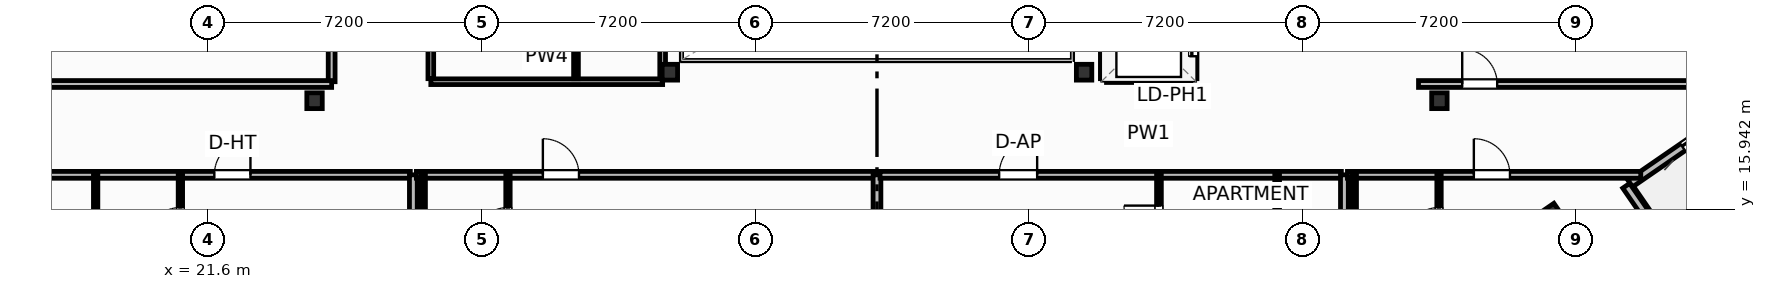
"""IFC4 building model, lengths in metres.
Left out: names, types, materials, properties, quantities, classifications, styles, units other than length and angle.
Written with IfcOpenShell. Run it as: python <this file> out.ifc"""

import sys

from ifc_helpers import new_model, si_unit, direction, frame, frame_2d, origin, origin_2d, place, context, subcontext, project, spatial, rectangle, i_section, extrude, element, fill, save


model = new_model("IFC4")
c1 = context("Model", 3, precision=1e-05, world=origin(), true_north=direction((0.0, 1.0)))
c2 = subcontext(c1, "Body", "Model", "MODEL_VIEW")
j1 = project(units=[si_unit("LENGTHUNIT", "METRE"), si_unit("PLANEANGLEUNIT", "RADIAN")], contexts=[c1])
p1 = place(None, origin())
s1 = spatial("IfcSite", under=j1, at=p1, CompositionType="ELEMENT")
p2 = place(p1, origin())
s2 = spatial("IfcBuilding", under=s1, at=p2, CompositionType="ELEMENT")
p3 = place(p2, frame((0.0, 0.0, 276.7)))
s3 = spatial("IfcBuildingStorey", under=s2, at=p3, CompositionType="ELEMENT", Elevation=276.7)
for number, where, z_axis, x_axis in (
    (1, (33.75, 19.55, 0.0), (0.0, 0.0, 1.0), (1.0, 0.0, 0.0)),
    (2, (44.65, 19.55, 0.0), (0.0, 0.0, 1.0), (1.0, 0.0, 0.0)),
    (3, (24.4, 18.8, 0.0), (0.0, 0.0, 1.0), (1.0, 0.0, 0.0)),
    (4, (54.0, 18.8, 0.0), (0.0, 0.0, 1.0), (1.0, 0.0, 0.0)),
):
    element("IfcColumn", number, at=place(p3, frame(where, z_axis=z_axis, x_axis=x_axis)), inside=s3, PredefinedType="COLUMN", context=c2, shape_type="SweptSolid", body=[
        extrude(i_section(OverallWidth=0.406, OverallDepth=0.416, WebThickness=0.03, FlangeThickness=0.048, FilletRadius=0.025, at=origin_2d()), origin(), (0.0, 0.0, 1.0), 3.7),
    ])
p4 = place(p3, frame((56.96, 15.823, 0.0), z_axis=(0.0, 0.0, 1.0), x_axis=(0.823532597628, 0.567268949127, 0.0)))
e5 = element("IfcColumn", 5, at=p4, inside=s3, PredefinedType="COLUMN", context=c2, shape_type="SweptSolid", body=[
    extrude(i_section(OverallWidth=0.401, OverallDepth=0.399, WebThickness=0.025, FlangeThickness=0.04, FilletRadius=0.022, at=origin_2d()), origin(), (0.0, 0.0, 1.0), 3.7),
])
p5 = place(p3, frame((63.605, 19.78, 0.0), z_axis=(0.0, 0.0, 1.0), x_axis=(-0.823541290762, -0.567256328665, 0.0)))
e6 = element("IfcWall", 6, at=p5, inside=s3, PredefinedType="SOLIDWALL", context=c2, shape_type="SweptSolid", body=[
    extrude(rectangle(XDim=5.567, YDim=0.22, at=frame_2d((2.784, 0.0))), origin(), (0.0, 0.0, 1.0), 2.73),
])
p6 = place(p5, frame((1.787, 0.0, 0.0)))
e7 = element("IfcOpeningElement", 7, at=p6, cuts=e6, PredefinedType="OPENING", context=c2, shape_type="SweptSolid", body=[
    extrude(rectangle(XDim=2.1, YDim=2.3, at=frame_2d((1.05, 1.15))), frame((0.0, 0.12, 0.0), z_axis=(0.0, -1.0, 0.0), x_axis=(1.0, 0.0, 0.0)), (0.0, 0.0, 1.0), 0.24),
])
p7 = place(p3, frame((60.036, 14.936, 0.0), z_axis=(0.0, 0.0, 1.0), x_axis=(-0.567273565974, 0.823529417415, 0.0)))
e8 = element("IfcWall", 8, at=p7, inside=s3, PredefinedType="SOLIDWALL", context=c2, shape_type="SweptSolid", body=[
    extrude(rectangle(XDim=1.975, YDim=0.22, at=frame_2d((0.988, 0.0))), origin(), (0.0, 0.0, 1.0), 2.73),
])
p8 = place(p3, frame((5.038, 16.85, 0.0), z_axis=(0.0, 0.0, 1.0), x_axis=(1.0, 0.0, 0.0)))
e9 = element("IfcWall", 9, at=p8, inside=s3, PredefinedType="PARTITIONING", context=c2, shape_type="SweptSolid", body=[
    extrude(rectangle(XDim=21.882, YDim=0.18, at=frame_2d((10.941, 0.0))), origin(), (0.0, 0.0, 1.0), 2.739),
])
p9 = place(p8, frame((16.725, 0.0, 0.0)))
e10 = element("IfcOpeningElement", 10, at=p9, cuts=e9, PredefinedType="OPENING", context=c2, shape_type="SweptSolid", body=[
    extrude(rectangle(XDim=0.95, YDim=2.15, at=frame_2d((0.475, 1.075))), frame((0.0, 0.1, 0.0), z_axis=(0.0, -1.0, 0.0), x_axis=(1.0, 0.0, 0.0)), (0.0, 0.0, 1.0), 0.2),
])
p10 = place(p3, frame((20.87, 14.33, 0.0), z_axis=(0.0, 0.0, 1.0), x_axis=(0.0, 1.0, 0.0)))
e11 = element("IfcWall", 11, at=p10, inside=s3, PredefinedType="PARTITIONING", context=c2, shape_type="SweptSolid", body=[
    extrude(rectangle(XDim=2.52, YDim=0.115, at=frame_2d((1.26, 0.0))), origin(), (0.0, 0.0, 1.0), 3.45),
])
p11 = place(p10, frame((0.76, 0.0, 0.0)))
e12 = element("IfcOpeningElement", 12, at=p11, cuts=e11, PredefinedType="OPENING", context=c2, shape_type="SweptSolid", body=[
    extrude(rectangle(XDim=0.9, YDim=2.05, at=frame_2d((0.45, 1.025))), frame((0.0, 0.067, 0.0), z_axis=(0.0, -1.0, 0.0), x_axis=(1.0, 0.0, 0.0)), (0.0, 0.0, 1.0), 0.135),
])
p12 = place(p3, frame((18.64, 14.33, 0.0), z_axis=(0.0, 0.0, 1.0), x_axis=(0.0, 1.0, 0.0)))
e13 = element("IfcWall", 13, at=p12, inside=s3, PredefinedType="PARTITIONING", context=c2, shape_type="SweptSolid", body=[
    extrude(rectangle(XDim=2.52, YDim=0.115, at=frame_2d((1.26, 0.0))), origin(), (0.0, 0.0, 1.0), 3.45),
])
p13 = place(p3, frame((27.0, -4.0, 0.0), z_axis=(0.0, 0.0, 1.0), x_axis=(0.0, 1.0, 0.0)))
e14 = element("IfcWall", 14, at=p13, inside=s3, PredefinedType="PARTITIONING", context=c2, shape_type="SweptSolid", body=[
    extrude(rectangle(XDim=20.85, YDim=0.205, at=frame_2d((10.425, 0.0))), origin(), (0.0, 0.0, 1.0), 3.45),
])
p14 = place(p3, frame((27.08, 16.85, 0.0), z_axis=(0.0, 0.0, 1.0), x_axis=(1.0, 0.0, 0.0)))
e15 = element("IfcWall", 15, at=p14, inside=s3, PredefinedType="PARTITIONING", context=c2, shape_type="SweptSolid", body=[
    extrude(rectangle(XDim=12.04, YDim=0.18, at=frame_2d((6.02, 0.0))), origin(), (0.0, 0.0, 1.0), 3.45),
])
p15 = place(p14, frame((3.328, 0.0, 0.0)))
e16 = element("IfcOpeningElement", 16, at=p15, cuts=e15, PredefinedType="OPENING", context=c2, shape_type="SweptSolid", body=[
    extrude(rectangle(XDim=0.95, YDim=2.15, at=frame_2d((0.475, 1.075))), frame((0.0, 0.1, 0.0), z_axis=(0.0, -1.0, 0.0), x_axis=(1.0, 0.0, 0.0)), (0.0, 0.0, 1.0), 0.2),
])
p16 = place(p3, frame((29.49, 14.33, 0.0), z_axis=(0.0, 0.0, 1.0), x_axis=(0.0, 1.0, 0.0)))
e17 = element("IfcWall", 17, at=p16, inside=s3, PredefinedType="PARTITIONING", context=c2, shape_type="SweptSolid", body=[
    extrude(rectangle(XDim=2.52, YDim=0.115, at=frame_2d((1.26, 0.0))), origin(), (0.0, 0.0, 1.0), 3.45),
])
p17 = place(p16, frame((0.76, 0.0, 0.0)))
e18 = element("IfcOpeningElement", 18, at=p17, cuts=e17, PredefinedType="OPENING", context=c2, shape_type="SweptSolid", body=[
    extrude(rectangle(XDim=0.9, YDim=2.05, at=frame_2d((0.45, 1.025))), frame((0.0, 0.067, 0.0), z_axis=(0.0, -1.0, 0.0), x_axis=(1.0, 0.0, 0.0)), (0.0, 0.0, 1.0), 0.135),
])
p18 = place(p3, frame((27.26, 14.33, 0.0), z_axis=(0.0, 0.0, 1.0), x_axis=(0.0, 1.0, 0.0)))
e19 = element("IfcWall", 19, at=p18, inside=s3, PredefinedType="PARTITIONING", context=c2, shape_type="SweptSolid", body=[
    extrude(rectangle(XDim=2.52, YDim=0.115, at=frame_2d((1.26, 0.0))), origin(), (0.0, 0.0, 1.0), 3.45),
])
p19 = place(p3, frame((39.2, 3.006, 0.0), z_axis=(0.0, 0.0, 1.0), x_axis=(0.0, 1.0, 0.0)))
e20 = element("IfcWall", 20, at=p19, inside=s3, PredefinedType="PARTITIONING", context=c2, shape_type="SweptSolid", body=[
    extrude(rectangle(XDim=13.844, YDim=0.205, at=frame_2d((6.922, 0.0))), origin(), (0.0, 0.0, 1.0), 3.45),
])
p20 = place(p3, frame((39.28, 16.85, 0.0), z_axis=(0.0, 0.0, 1.0), x_axis=(1.0, 0.0, 0.0)))
e21 = element("IfcWall", 21, at=p20, inside=s3, PredefinedType="PARTITIONING", context=c2, shape_type="SweptSolid", body=[
    extrude(rectangle(XDim=12.14, YDim=0.18, at=frame_2d((6.07, 0.0))), origin(), (0.0, 0.0, 1.0), 3.45),
])
p21 = place(p20, frame((3.135, 0.0, 0.0)))
e22 = element("IfcOpeningElement", 22, at=p21, cuts=e21, PredefinedType="OPENING", context=c2, shape_type="SweptSolid", body=[
    extrude(rectangle(XDim=1.0, YDim=2.2, at=frame_2d((0.5, 1.1))), frame((0.0, 0.1, 0.0), z_axis=(0.0, -1.0, 0.0), x_axis=(1.0, 0.0, 0.0)), (0.0, 0.0, 1.0), 0.2),
])
p22 = place(p3, frame((46.62, 5.567, 0.0), z_axis=(0.0, 0.0, 1.0), x_axis=(0.0, 1.0, 0.0)))
e23 = element("IfcWall", 23, at=p22, inside=s3, PredefinedType="PARTITIONING", context=c2, shape_type="SweptSolid", body=[
    extrude(rectangle(XDim=11.283, YDim=0.125, at=frame_2d((5.642, 0.0))), origin(), (0.0, 0.0, 1.0), 3.45),
])
p23 = place(p22, frame((4.757, 0.0, 0.0)))
e24 = element("IfcOpeningElement", 24, at=p23, cuts=e23, PredefinedType="OPENING", context=c2, shape_type="SweptSolid", body=[
    extrude(rectangle(XDim=0.92, YDim=2.05, at=frame_2d((0.46, 1.025))), frame((0.0, 0.073, 0.0), z_axis=(0.0, -1.0, 0.0), x_axis=(1.0, 0.0, 0.0)), (0.0, 0.0, 1.0), 0.145),
])
p24 = place(p22, frame((7.26, 0.0, 0.0)))
e25 = element("IfcOpeningElement", 25, at=p24, cuts=e23, PredefinedType="OPENING", context=c2, shape_type="SweptSolid", body=[
    extrude(rectangle(XDim=0.9, YDim=2.05, at=frame_2d((0.45, 1.025))), frame((0.0, 0.073, 0.0), z_axis=(0.0, -1.0, 0.0), x_axis=(1.0, 0.0, 0.0)), (0.0, 0.0, 1.0), 0.145),
])
p25 = place(p22, frame((9.553, 0.0, 0.0)))
e26 = element("IfcOpeningElement", 26, at=p25, cuts=e23, PredefinedType="OPENING", context=c2, shape_type="SweptSolid", body=[
    extrude(rectangle(XDim=0.92, YDim=2.05, at=frame_2d((0.46, 1.025))), frame((0.0, 0.073, 0.0), z_axis=(0.0, -1.0, 0.0), x_axis=(1.0, 0.0, 0.0)), (0.0, 0.0, 1.0), 0.145),
])
p26 = place(p3, frame((49.73, 14.44, 0.0), z_axis=(0.0, 0.0, 1.0), x_axis=(0.0, 1.0, 0.0)))
e27 = element("IfcWall", 27, at=p26, inside=s3, PredefinedType="PARTITIONING", context=c2, shape_type="SweptSolid", body=[
    extrude(rectangle(XDim=2.41, YDim=0.125, at=frame_2d((1.205, 0.0))), origin(), (0.0, 0.0, 1.0), 3.45),
])
p27 = place(p3, frame((51.5, 11.479, 0.0), z_axis=(0.0, 0.0, 1.0), x_axis=(0.0, 1.0, 0.0)))
e28 = element("IfcWall", 28, at=p27, inside=s3, PredefinedType="PARTITIONING", context=c2, shape_type="SweptSolid", body=[
    extrude(rectangle(XDim=5.372, YDim=0.205, at=frame_2d((2.686, 0.0))), origin(), (0.0, 0.0, 1.0), 3.45),
])
p28 = place(p3, frame((51.58, 16.85, 0.0), z_axis=(0.0, 0.0, 1.0), x_axis=(1.0, 0.0, 0.0)))
e29 = element("IfcWall", 29, at=p28, inside=s3, PredefinedType="PARTITIONING", context=c2, shape_type="SweptSolid", body=[
    extrude(rectangle(XDim=7.718, YDim=0.18, at=frame_2d((3.859, 0.0))), origin(), (0.0, 0.0, 1.0), 3.45),
])
p29 = place(p28, frame((3.326, 0.0, 0.0)))
e30 = element("IfcOpeningElement", 30, at=p29, cuts=e29, PredefinedType="OPENING", context=c2, shape_type="SweptSolid", body=[
    extrude(rectangle(XDim=0.95, YDim=2.15, at=frame_2d((0.475, 1.075))), frame((0.0, 0.1, 0.0), z_axis=(0.0, -1.0, 0.0), x_axis=(1.0, 0.0, 0.0)), (0.0, 0.0, 1.0), 0.2),
])
p30 = place(p3, frame((53.99, 14.33, 0.0), z_axis=(0.0, 0.0, 1.0), x_axis=(0.0, 1.0, 0.0)))
e31 = element("IfcWall", 31, at=p30, inside=s3, PredefinedType="PARTITIONING", context=c2, shape_type="SweptSolid", body=[
    extrude(rectangle(XDim=2.52, YDim=0.115, at=frame_2d((1.26, 0.0))), origin(), (0.0, 0.0, 1.0), 3.45),
])
p31 = place(p30, frame((0.76, 0.0, 0.0)))
e32 = element("IfcOpeningElement", 32, at=p31, cuts=e31, PredefinedType="OPENING", context=c2, shape_type="SweptSolid", body=[
    extrude(rectangle(XDim=0.9, YDim=2.05, at=frame_2d((0.45, 1.025))), frame((0.0, 0.067, 0.0), z_axis=(0.0, -1.0, 0.0), x_axis=(1.0, 0.0, 0.0)), (0.0, 0.0, 1.0), 0.135),
])
p32 = place(p3, frame((51.76, 14.33, 0.0), z_axis=(0.0, 0.0, 1.0), x_axis=(0.0, 1.0, 0.0)))
e33 = element("IfcWall", 33, at=p32, inside=s3, PredefinedType="PARTITIONING", context=c2, shape_type="SweptSolid", body=[
    extrude(rectangle(XDim=2.52, YDim=0.115, at=frame_2d((1.26, 0.0))), origin(), (0.0, 0.0, 1.0), 3.45),
])
p33 = place(p3, frame((24.85, 19.3, 0.0), z_axis=(0.0, 0.0, 1.0), x_axis=(0.0, 1.0, 0.0)))
e34 = element("IfcWall", 34, at=p33, inside=s3, PredefinedType="PARTITIONING", context=c2, shape_type="SweptSolid", body=[
    extrude(rectangle(XDim=3.57, YDim=0.18, at=frame_2d((1.785, 0.0))), origin(), (0.0, 0.0, 1.0), 3.45),
])
p34 = place(p33, frame((1.5, 0.0, 0.0)))
e35 = element("IfcOpeningElement", 35, at=p34, cuts=e34, PredefinedType="OPENING", context=c2, shape_type="SweptSolid", body=[
    extrude(rectangle(XDim=0.92, YDim=2.05, at=frame_2d((0.46, 1.025))), frame((0.0, 0.1, 0.0), z_axis=(0.0, -1.0, 0.0), x_axis=(1.0, 0.0, 0.0)), (0.0, 0.0, 1.0), 0.2),
])
p35 = place(p3, frame((3.392, 19.24, 0.0), z_axis=(0.0, 0.0, 1.0), x_axis=(1.0, 0.0, 0.0)))
e36 = element("IfcWall", 36, at=p35, inside=s3, PredefinedType="PARTITIONING", context=c2, shape_type="SweptSolid", body=[
    extrude(rectangle(XDim=21.458, YDim=0.18, at=frame_2d((10.729, 0.0))), origin(), (0.0, 0.0, 1.0), 3.45),
])
p36 = place(p3, frame((53.45, 19.24, 0.0), z_axis=(0.0, 0.0, 1.0), x_axis=(1.0, 0.0, 0.0)))
e37 = element("IfcWall", 37, at=p36, inside=s3, PredefinedType="PARTITIONING", context=c2, shape_type="SweptSolid", body=[
    extrude(rectangle(XDim=9.318, YDim=0.18, at=frame_2d((4.659, 0.0))), origin(), (0.0, 0.0, 1.0), 2.739),
])
p37 = place(p36, frame((1.15, 0.0, 0.0)))
e38 = element("IfcOpeningElement", 38, at=p37, cuts=e37, PredefinedType="OPENING", context=c2, shape_type="SweptSolid", body=[
    extrude(rectangle(XDim=0.92, YDim=2.05, at=frame_2d((0.46, 1.025))), frame((0.0, 0.1, 0.0), z_axis=(0.0, -1.0, 0.0), x_axis=(1.0, 0.0, 0.0)), (0.0, 0.0, 1.0), 0.2),
])
p38 = place(p3, frame((27.46, 19.3, 0.0), z_axis=(0.0, 0.0, 1.0), x_axis=(1.0, 0.0, 0.0)))
e39 = element("IfcWall", 39, at=p38, inside=s3, PredefinedType="PARTITIONING", context=c2, shape_type="SweptSolid", body=[
    extrude(rectangle(XDim=6.1, YDim=0.15, at=frame_2d((3.05, 0.0))), origin(), (0.0, 0.0, 1.0), 2.662),
])
p39 = place(p3, frame((31.28, 19.38, 0.0), z_axis=(0.0, 0.0, 1.0), x_axis=(0.0, 1.0, 0.0)))
e40 = element("IfcWall", 40, at=p39, inside=s3, PredefinedType="PARTITIONING", context=c2, shape_type="SweptSolid", body=[
    extrude(rectangle(XDim=7.16, YDim=0.125, at=frame_2d((3.58, 0.0))), origin(), (0.0, 0.0, 1.0), 3.45),
])
p40 = place(p3, frame((27.46, 19.38, 0.0), z_axis=(0.0, 0.0, 1.0), x_axis=(0.0, 1.0, 0.0)))
e41 = element("IfcWall", 41, at=p40, inside=s3, PredefinedType="PARTITIONING", context=c2, shape_type="SweptSolid", body=[
    extrude(rectangle(XDim=7.16, YDim=0.15, at=frame_2d((3.58, 0.0))), origin(), (0.0, 0.0, 1.0), 3.45),
])
p41 = place(p40, frame((1.4, 0.0, 0.0)))
e42 = element("IfcOpeningElement", 42, at=p41, cuts=e41, PredefinedType="OPENING", context=c2, shape_type="SweptSolid", body=[
    extrude(rectangle(XDim=0.95, YDim=2.05, at=frame_2d((0.475, 1.025))), frame((0.0, 0.085, 0.0), z_axis=(0.0, -1.0, 0.0), x_axis=(1.0, 0.0, 0.0)), (0.0, 0.0, 1.0), 0.17),
])
p42 = place(p3, frame((33.56, 19.38, 0.0), z_axis=(0.0, 0.0, 1.0), x_axis=(0.0, 1.0, 0.0)))
e43 = element("IfcWall", 43, at=p42, inside=s3, PredefinedType="PARTITIONING", context=c2, shape_type="SweptSolid", body=[
    extrude(rectangle(XDim=7.16, YDim=0.15, at=frame_2d((3.58, 0.0))), origin(), (0.0, 0.0, 1.0), 2.824),
])
p43 = place(p3, frame((45.24, 19.38, 0.0), z_axis=(0.0, 0.0, 1.0), x_axis=(1.0, 0.0, 0.0)))
e44 = element("IfcWall", 44, at=p43, inside=s3, PredefinedType="PARTITIONING", context=c2, shape_type="SweptSolid", body=[
    extrude(rectangle(XDim=2.22, YDim=0.2, at=frame_2d((1.11, 0.0))), origin(), (0.0, 0.0, 1.0), 2.662),
])
p44 = place(p3, frame((45.18, 19.38, 0.0), z_axis=(0.0, 0.0, 1.0), x_axis=(0.0, 1.0, 0.0)))
e45 = element("IfcWall", 45, at=p44, inside=s3, PredefinedType="PARTITIONING", context=c2, shape_type="SweptSolid", body=[
    extrude(rectangle(XDim=6.9, YDim=0.2, at=frame_2d((3.45, 0.0))), origin(), (0.0, 0.0, 1.0), 3.45),
])
p45 = place(p3, frame((47.52, 19.38, 0.0), z_axis=(0.0, 0.0, 1.0), x_axis=(0.0, 1.0, 0.0)))
e46 = element("IfcWall", 46, at=p45, inside=s3, PredefinedType="PARTITIONING", context=c2, shape_type="SweptSolid", body=[
    extrude(rectangle(XDim=6.9, YDim=0.2, at=frame_2d((3.45, 0.0))), origin(), (0.0, 0.0, 1.0), 3.45),
])
p46 = place(p45, frame((0.59, 0.0, 0.0)))
e47 = element("IfcOpeningElement", 47, at=p46, cuts=e46, PredefinedType="OPENING", context=c2, shape_type="SweptSolid", body=[
    extrude(rectangle(XDim=1.1, YDim=2.15, at=frame_2d((0.55, 1.075))), frame((0.0, 0.11, 0.0), z_axis=(0.0, -1.0, 0.0), x_axis=(1.0, 0.0, 0.0)), (0.0, 0.0, 1.0), 0.22),
])
p47 = place(p45, frame((2.89, 0.0, 0.0)))
e48 = element("IfcOpeningElement", 48, at=p47, cuts=e46, PredefinedType="OPENING", context=c2, shape_type="SweptSolid", body=[
    extrude(rectangle(XDim=1.1, YDim=2.15, at=frame_2d((0.55, 1.075))), frame((0.0, 0.11, 0.0), z_axis=(0.0, -1.0, 0.0), x_axis=(1.0, 0.0, 0.0)), (0.0, 0.0, 1.0), 0.22),
])
p48 = place(p45, frame((5.19, 0.0, 0.0)))
e49 = element("IfcOpeningElement", 49, at=p48, cuts=e46, PredefinedType="OPENING", context=c2, shape_type="SweptSolid", body=[
    extrude(rectangle(XDim=1.1, YDim=2.15, at=frame_2d((0.55, 1.075))), frame((0.0, 0.11, 0.0), z_axis=(0.0, -1.0, 0.0), x_axis=(1.0, 0.0, 0.0)), (0.0, 0.0, 1.0), 0.22),
])
p49 = place(p6, origin())
e50 = element("IfcDoor", 50, at=p49, inside=s3, OperationType="SLIDING_TO_LEFT", PredefinedType="DOOR", context=c2, shape_type="SweptSolid", body=[
    extrude(rectangle(XDim=2.1, YDim=2.3, at=frame_2d((1.05, 1.15))), frame((0.0, 0.025, 0.0), z_axis=(0.0, -1.0, 0.0), x_axis=(1.0, 0.0, 0.0)), (0.0, 0.0, 1.0), 0.05),
])
fill(e7, e50)
p50 = place(p9, origin())
e51 = element("IfcDoor", 51, at=p50, inside=s3, OperationType="SINGLE_SWING_RIGHT", PredefinedType="DOOR", context=c2, shape_type="SweptSolid", body=[
    extrude(rectangle(XDim=0.95, YDim=2.15, at=frame_2d((0.475, 1.075))), frame((0.0, 0.025, 0.0), z_axis=(0.0, -1.0, 0.0), x_axis=(1.0, 0.0, 0.0)), (0.0, 0.0, 1.0), 0.05),
])
fill(e10, e51)
p51 = place(p11, origin())
e52 = element("IfcDoor", 52, at=p51, inside=s3, OperationType="SINGLE_SWING_LEFT", PredefinedType="DOOR", context=c2, shape_type="SweptSolid", body=[
    extrude(rectangle(XDim=0.9, YDim=2.05, at=frame_2d((0.45, 1.025))), frame((0.0, 0.025, 0.0), z_axis=(0.0, -1.0, 0.0), x_axis=(1.0, 0.0, 0.0)), (0.0, 0.0, 1.0), 0.05),
])
fill(e12, e52)
p52 = place(p15, origin())
e53 = element("IfcDoor", 53, at=p52, inside=s3, OperationType="SINGLE_SWING_LEFT", PredefinedType="DOOR", context=c2, shape_type="SweptSolid", body=[
    extrude(rectangle(XDim=0.95, YDim=2.15, at=frame_2d((0.475, 1.075))), frame((0.0, 0.025, 0.0), z_axis=(0.0, -1.0, 0.0), x_axis=(1.0, 0.0, 0.0)), (0.0, 0.0, 1.0), 0.05),
])
fill(e16, e53)
p53 = place(p17, origin())
e54 = element("IfcDoor", 54, at=p53, inside=s3, OperationType="SINGLE_SWING_LEFT", PredefinedType="DOOR", context=c2, shape_type="SweptSolid", body=[
    extrude(rectangle(XDim=0.9, YDim=2.05, at=frame_2d((0.45, 1.025))), frame((0.0, 0.025, 0.0), z_axis=(0.0, -1.0, 0.0), x_axis=(1.0, 0.0, 0.0)), (0.0, 0.0, 1.0), 0.05),
])
fill(e18, e54)
p54 = place(p21, origin())
e55 = element("IfcDoor", 55, at=p54, inside=s3, OperationType="SINGLE_SWING_RIGHT", PredefinedType="DOOR", context=c2, shape_type="SweptSolid", body=[
    extrude(rectangle(XDim=1.0, YDim=2.2, at=frame_2d((0.5, 1.1))), frame((0.0, 0.025, 0.0), z_axis=(0.0, -1.0, 0.0), x_axis=(1.0, 0.0, 0.0)), (0.0, 0.0, 1.0), 0.05),
])
fill(e22, e55)
p55 = place(p25, origin())
e56 = element("IfcDoor", 56, at=p55, inside=s3, OperationType="SINGLE_SWING_RIGHT", PredefinedType="DOOR", context=c2, shape_type="SweptSolid", body=[
    extrude(rectangle(XDim=0.92, YDim=2.05, at=frame_2d((0.46, 1.025))), frame((0.0, 0.025, 0.0), z_axis=(0.0, -1.0, 0.0), x_axis=(1.0, 0.0, 0.0)), (0.0, 0.0, 1.0), 0.05),
])
fill(e26, e56)
p56 = place(p29, origin())
e57 = element("IfcDoor", 57, at=p56, inside=s3, OperationType="SINGLE_SWING_LEFT", PredefinedType="DOOR", context=c2, shape_type="SweptSolid", body=[
    extrude(rectangle(XDim=0.95, YDim=2.15, at=frame_2d((0.475, 1.075))), frame((0.0, 0.025, 0.0), z_axis=(0.0, -1.0, 0.0), x_axis=(1.0, 0.0, 0.0)), (0.0, 0.0, 1.0), 0.05),
])
fill(e30, e57)
p57 = place(p31, origin())
e58 = element("IfcDoor", 58, at=p57, inside=s3, OperationType="SINGLE_SWING_LEFT", PredefinedType="DOOR", context=c2, shape_type="SweptSolid", body=[
    extrude(rectangle(XDim=0.9, YDim=2.05, at=frame_2d((0.45, 1.025))), frame((0.0, 0.025, 0.0), z_axis=(0.0, -1.0, 0.0), x_axis=(1.0, 0.0, 0.0)), (0.0, 0.0, 1.0), 0.05),
])
fill(e32, e58)
p58 = place(p37, origin())
e59 = element("IfcDoor", 59, at=p58, inside=s3, OperationType="SINGLE_SWING_LEFT", PredefinedType="DOOR", context=c2, shape_type="SweptSolid", body=[
    extrude(rectangle(XDim=0.92, YDim=2.05, at=frame_2d((0.46, 1.025))), frame((0.0, 0.025, 0.0), z_axis=(0.0, -1.0, 0.0), x_axis=(1.0, 0.0, 0.0)), (0.0, 0.0, 1.0), 0.05),
])
fill(e38, e59)
p59 = place(p46, origin())
e60 = element("IfcDoor", 60, at=p59, inside=s3, OperationType="SLIDING_TO_LEFT", PredefinedType="DOOR", context=c2, shape_type="SweptSolid", body=[
    extrude(rectangle(XDim=1.1, YDim=2.15, at=frame_2d((0.55, 1.075))), frame((0.0, 0.025, 0.0), z_axis=(0.0, -1.0, 0.0), x_axis=(1.0, 0.0, 0.0)), (0.0, 0.0, 1.0), 0.05),
])
fill(e47, e60)
save(model, sys.argv[1])
